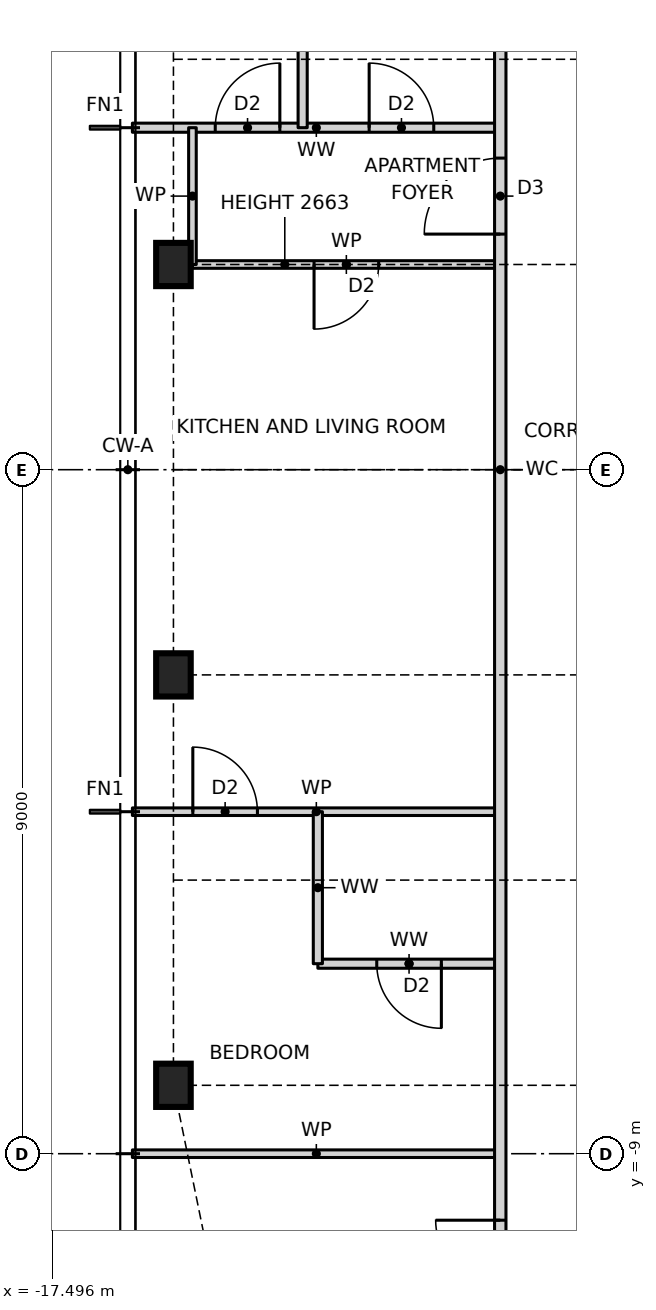
"""IFC4 building model, lengths in metres.
Left out: names, types, materials, properties, quantities, classifications, styles, units other than length and angle.
Written with IfcOpenShell. Run it as: python <this file> out.ifc"""

import sys

from ifc_helpers import new_model, si_unit, direction, frame, frame_2d, origin, origin_2d, place, context, subcontext, project, spatial, rectangle, i_section, extrude, element, fill, save


model = new_model("IFC4")
c1 = context("Model", 3, precision=1e-05, world=origin(), true_north=direction((0.0, 1.0)))
c2 = subcontext(c1, "Body", "Model", "MODEL_VIEW")
j1 = project(units=[si_unit("LENGTHUNIT", "METRE"), si_unit("PLANEANGLEUNIT", "RADIAN")], contexts=[c1])
p1 = place(None, origin())
s1 = spatial("IfcSite", under=j1, at=p1, CompositionType="ELEMENT")
p2 = place(p1, origin())
s2 = spatial("IfcBuilding", under=s1, at=p2, CompositionType="ELEMENT")
p3 = place(p2, frame((0.0, 0.0, 239.5)))
s3 = spatial("IfcBuildingStorey", under=s2, at=p3, CompositionType="ELEMENT", Elevation=239.5)
for number, where, z_axis, x_axis in (
    (1, (-15.9, 2.7, 0.0), (0.0, 0.0, 1.0), (1.0, 0.0, 0.0)),
    (2, (-15.9, -2.7, 0.0), (0.0, 0.0, 1.0), (1.0, 0.0, 0.0)),
    (3, (-15.9, -8.1, 0.0), (0.0, 0.0, 1.0), (1.0, 0.0, 0.0)),
):
    element("IfcColumn", number, at=place(p3, frame(where, z_axis=z_axis, x_axis=x_axis)), inside=s3, PredefinedType="COLUMN", context=c2, shape_type="SweptSolid", body=[
        extrude(i_section(OverallWidth=0.455, OverallDepth=0.569, WebThickness=0.078, FlangeThickness=0.125, at=origin_2d()), origin(), (0.0, 0.0, 1.0), 3.5),
    ])
p4 = place(p3, frame((-16.44, -9.0, 0.0), z_axis=(0.0, 0.0, 1.0), x_axis=(1.0, 0.0, 0.0)))
e4 = element("IfcWall", 4, at=p4, inside=s3, PredefinedType="PARTITIONING", context=c2, shape_type="SweptSolid", body=[
    extrude(rectangle(XDim=4.84, YDim=0.1, at=frame_2d((2.42, 0.0))), origin(), (0.0, 0.0, 1.0), 3.27),
])
p5 = place(p3, frame((-14.0, -6.5, 0.0), z_axis=(0.0, 0.0, 1.0), x_axis=(1.0, 0.0, 0.0)))
e5 = element("IfcWall", 5, at=p5, inside=s3, PredefinedType="PARTITIONING", context=c2, shape_type="SweptSolid", body=[
    extrude(rectangle(XDim=2.4, YDim=0.12, at=frame_2d((1.2, 0.0))), origin(), (0.0, 0.0, 1.0), 3.27),
])
p6 = place(p5, frame((0.775, 0.0, 0.0)))
e6 = element("IfcOpeningElement", 6, at=p6, cuts=e5, PredefinedType="OPENING", context=c2, shape_type="SweptSolid", body=[
    extrude(rectangle(XDim=0.85, YDim=2.1, at=frame_2d((0.425, 1.05))), frame((0.0, 0.07, 0.0), z_axis=(0.0, -1.0, 0.0), x_axis=(1.0, 0.0, 0.0)), (0.0, 0.0, 1.0), 0.14),
])
p7 = place(p3, frame((-16.44, -4.5, 0.0), z_axis=(0.0, 0.0, 1.0), x_axis=(1.0, 0.0, 0.0)))
e7 = element("IfcWall", 7, at=p7, inside=s3, PredefinedType="PARTITIONING", context=c2, shape_type="SweptSolid", body=[
    extrude(rectangle(XDim=4.84, YDim=0.1, at=frame_2d((2.42, 0.0))), origin(), (0.0, 0.0, 1.0), 3.27),
])
p8 = place(p7, frame((0.795, 0.0, 0.0)))
e8 = element("IfcOpeningElement", 8, at=p8, cuts=e7, PredefinedType="OPENING", context=c2, shape_type="SweptSolid", body=[
    extrude(rectangle(XDim=0.85, YDim=2.1, at=frame_2d((0.425, 1.05))), frame((0.0, 0.06, 0.0), z_axis=(0.0, -1.0, 0.0), x_axis=(1.0, 0.0, 0.0)), (0.0, 0.0, 1.0), 0.12),
])
p9 = place(p3, frame((-15.65, 2.7, 0.0), z_axis=(0.0, 0.0, 1.0), x_axis=(1.0, 0.0, 0.0)))
e9 = element("IfcWall", 9, at=p9, inside=s3, PredefinedType="PARTITIONING", context=c2, shape_type="SweptSolid", body=[
    extrude(rectangle(XDim=4.05, YDim=0.1, at=frame_2d((2.025, 0.0))), origin(), (0.0, 0.0, 1.0), 2.663),
])
p10 = place(p9, frame((1.6, 0.0, 0.0)))
e10 = element("IfcOpeningElement", 10, at=p10, cuts=e9, PredefinedType="OPENING", context=c2, shape_type="SweptSolid", body=[
    extrude(rectangle(XDim=0.85, YDim=2.1, at=frame_2d((0.425, 1.05))), frame((0.0, 0.06, 0.0), z_axis=(0.0, -1.0, 0.0), x_axis=(1.0, 0.0, 0.0)), (0.0, 0.0, 1.0), 0.12),
])
p11 = place(p3, frame((-16.44, 4.5, 0.0), z_axis=(0.0, 0.0, 1.0), x_axis=(1.0, 0.0, 0.0)))
e11 = element("IfcWall", 11, at=p11, inside=s3, PredefinedType="PARTITIONING", context=c2, shape_type="SweptSolid", body=[
    extrude(rectangle(XDim=4.84, YDim=0.12, at=frame_2d((2.42, 0.0))), origin(), (0.0, 0.0, 1.0), 3.27),
])
p12 = place(p11, frame((1.09, 0.0, 0.0)))
e12 = element("IfcOpeningElement", 12, at=p12, cuts=e11, PredefinedType="OPENING", context=c2, shape_type="SweptSolid", body=[
    extrude(rectangle(XDim=0.85, YDim=2.1, at=frame_2d((0.425, 1.05))), frame((0.0, 0.07, 0.0), z_axis=(0.0, -1.0, 0.0), x_axis=(1.0, 0.0, 0.0)), (0.0, 0.0, 1.0), 0.14),
])
p13 = place(p11, frame((3.115, 0.0, 0.0)))
e13 = element("IfcOpeningElement", 13, at=p13, cuts=e11, PredefinedType="OPENING", context=c2, shape_type="SweptSolid", body=[
    extrude(rectangle(XDim=0.85, YDim=2.1, at=frame_2d((0.425, 1.05))), frame((0.0, 0.07, 0.0), z_axis=(0.0, -1.0, 0.0), x_axis=(1.0, 0.0, 0.0)), (0.0, 0.0, 1.0), 0.14),
])
p14 = place(p3, frame((-11.6, -11.6, 0.0), z_axis=(0.0, 0.0, 1.0), x_axis=(0.0, 1.0, 0.0)))
e14 = element("IfcWall", 14, at=p14, inside=s3, PredefinedType="PARTITIONING", context=c2, shape_type="SweptSolid", body=[
    extrude(rectangle(XDim=23.2, YDim=0.15, at=frame_2d((11.6, 0.0))), origin(), (0.0, 0.0, 1.0), 3.27),
])
p15 = place(p14, frame((14.7, 0.0, 0.0)))
e15 = element("IfcOpeningElement", 15, at=p15, cuts=e14, PredefinedType="OPENING", context=c2, shape_type="SweptSolid", body=[
    extrude(rectangle(XDim=1.0, YDim=2.1, at=frame_2d((0.5, 1.05))), frame((0.0, 0.085, 0.0), z_axis=(0.0, -1.0, 0.0), x_axis=(1.0, 0.0, 0.0)), (0.0, 0.0, 1.0), 0.17),
])
p16 = place(p14, frame((0.875, 0.0, 0.0)))
e16 = element("IfcOpeningElement", 16, at=p16, cuts=e14, PredefinedType="OPENING", context=c2, shape_type="SweptSolid", body=[
    extrude(rectangle(XDim=0.85, YDim=2.1, at=frame_2d((0.425, 1.05))), frame((0.0, 0.085, 0.0), z_axis=(0.0, -1.0, 0.0), x_axis=(1.0, 0.0, 0.0)), (0.0, 0.0, 1.0), 0.17),
])
p17 = place(p3, frame((-14.0, -6.5, 0.0), z_axis=(0.0, 0.0, 1.0), x_axis=(0.0, 1.0, 0.0)))
e17 = element("IfcWall", 17, at=p17, inside=s3, PredefinedType="PARTITIONING", context=c2, shape_type="SweptSolid", body=[
    extrude(rectangle(XDim=2.0, YDim=0.12, at=frame_2d((1.0, 0.0))), origin(), (0.0, 0.0, 1.0), 3.27),
])
p18 = place(p3, frame((-14.2, 4.5, 0.0), z_axis=(0.0, 0.0, 1.0), x_axis=(0.0, 1.0, 0.0)))
e18 = element("IfcWall", 18, at=p18, inside=s3, PredefinedType="PARTITIONING", context=c2, shape_type="SweptSolid", body=[
    extrude(rectangle(XDim=2.4, YDim=0.12, at=frame_2d((1.2, 0.0))), origin(), (0.0, 0.0, 1.0), 3.27),
])
p19 = place(p3, frame((-15.65, 2.7, 0.0), z_axis=(0.0, 0.0, 1.0), x_axis=(0.0, 1.0, 0.0)))
e19 = element("IfcWall", 19, at=p19, inside=s3, PredefinedType="PARTITIONING", context=c2, shape_type="SweptSolid", body=[
    extrude(rectangle(XDim=1.8, YDim=0.1, at=frame_2d((0.9, 0.0))), origin(), (0.0, 0.0, 1.0), 3.27),
])
p20 = place(p15, origin())
e20 = element("IfcDoor", 20, at=p20, inside=s3, OperationType="SINGLE_SWING_LEFT", PredefinedType="DOOR", context=c2, shape_type="SweptSolid", body=[
    extrude(rectangle(XDim=1.0, YDim=2.1, at=frame_2d((0.5, 1.05))), frame((0.0, 0.025, 0.0), z_axis=(0.0, -1.0, 0.0), x_axis=(1.0, 0.0, 0.0)), (0.0, 0.0, 1.0), 0.05),
])
fill(e15, e20)
p21 = place(p10, frame((0.85, 0.0, 0.0), z_axis=(0.0, 0.0, 1.0), x_axis=(-1.0, 0.0, 0.0)))
e21 = element("IfcDoor", 21, at=p21, inside=s3, OperationType="SINGLE_SWING_RIGHT", PredefinedType="DOOR", context=c2, shape_type="SweptSolid", body=[
    extrude(rectangle(XDim=0.85, YDim=2.1, at=frame_2d((0.425, 1.05))), frame((0.0, 0.025, 0.0), z_axis=(0.0, -1.0, 0.0), x_axis=(1.0, 0.0, 0.0)), (0.0, 0.0, 1.0), 0.05),
])
fill(e10, e21)
p22 = place(p12, origin())
e22 = element("IfcDoor", 22, at=p22, inside=s3, OperationType="SINGLE_SWING_RIGHT", PredefinedType="DOOR", context=c2, shape_type="SweptSolid", body=[
    extrude(rectangle(XDim=0.85, YDim=2.1, at=frame_2d((0.425, 1.05))), frame((0.0, 0.025, 0.0), z_axis=(0.0, -1.0, 0.0), x_axis=(1.0, 0.0, 0.0)), (0.0, 0.0, 1.0), 0.05),
])
fill(e12, e22)
p23 = place(p13, origin())
e23 = element("IfcDoor", 23, at=p23, inside=s3, OperationType="SINGLE_SWING_LEFT", PredefinedType="DOOR", context=c2, shape_type="SweptSolid", body=[
    extrude(rectangle(XDim=0.85, YDim=2.1, at=frame_2d((0.425, 1.05))), frame((0.0, 0.025, 0.0), z_axis=(0.0, -1.0, 0.0), x_axis=(1.0, 0.0, 0.0)), (0.0, 0.0, 1.0), 0.05),
])
fill(e13, e23)
p24 = place(p8, origin())
e24 = element("IfcDoor", 24, at=p24, inside=s3, OperationType="SINGLE_SWING_LEFT", PredefinedType="DOOR", context=c2, shape_type="SweptSolid", body=[
    extrude(rectangle(XDim=0.85, YDim=2.1, at=frame_2d((0.425, 1.05))), frame((0.0, 0.025, 0.0), z_axis=(0.0, -1.0, 0.0), x_axis=(1.0, 0.0, 0.0)), (0.0, 0.0, 1.0), 0.05),
])
fill(e8, e24)
p25 = place(p6, frame((0.85, 0.0, 0.0), z_axis=(0.0, 0.0, 1.0), x_axis=(-1.0, 0.0, 0.0)))
e25 = element("IfcDoor", 25, at=p25, inside=s3, OperationType="SINGLE_SWING_LEFT", PredefinedType="DOOR", context=c2, shape_type="SweptSolid", body=[
    extrude(rectangle(XDim=0.85, YDim=2.1, at=frame_2d((0.425, 1.05))), frame((0.0, 0.025, 0.0), z_axis=(0.0, -1.0, 0.0), x_axis=(1.0, 0.0, 0.0)), (0.0, 0.0, 1.0), 0.05),
])
fill(e6, e25)
p26 = place(p16, origin())
e26 = element("IfcDoor", 26, at=p26, inside=s3, OperationType="SINGLE_SWING_RIGHT", PredefinedType="DOOR", context=c2, shape_type="SweptSolid", body=[
    extrude(rectangle(XDim=0.85, YDim=2.1, at=frame_2d((0.425, 1.05))), frame((0.0, 0.025, 0.0), z_axis=(0.0, -1.0, 0.0), x_axis=(1.0, 0.0, 0.0)), (0.0, 0.0, 1.0), 0.05),
])
fill(e16, e26)
save(model, sys.argv[1])
